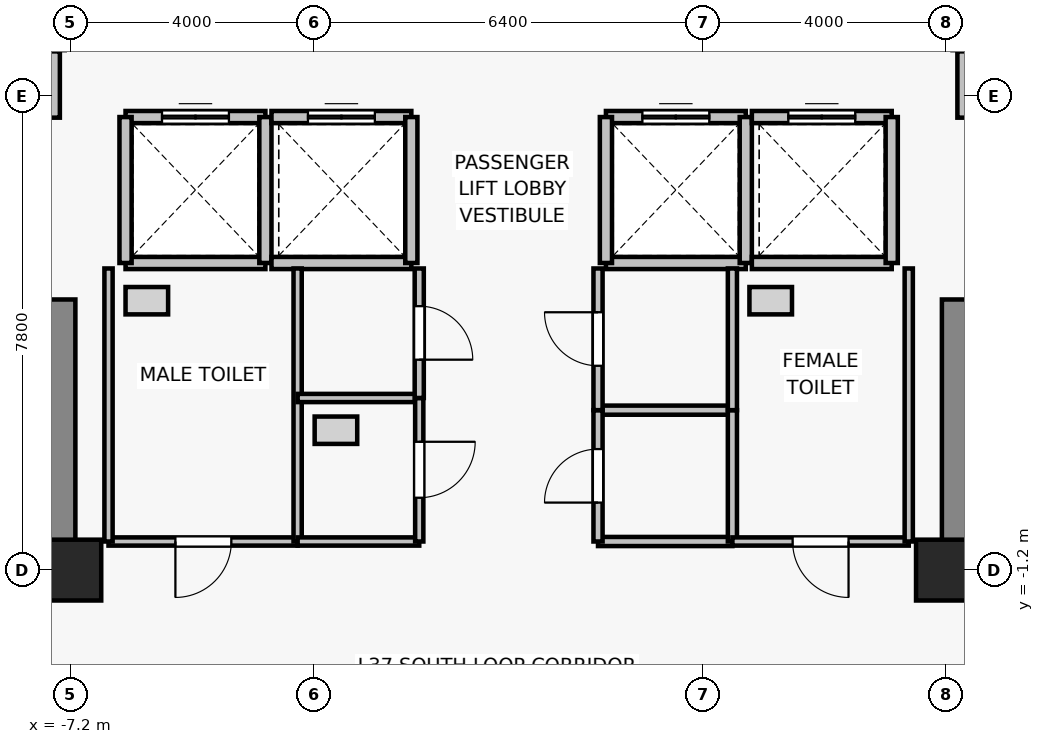
"""IFC4 building model, lengths in metres.
Left out: names, types, materials, properties, quantities, classifications, styles, units other than length and angle.
Written with IfcOpenShell. Run it as: python <this file> out.ifc"""

import sys

from ifc_helpers import new_model, si_unit, direction, frame, frame_2d, origin, origin_2d, place, context, subcontext, project, spatial, rectangle, extrude, source, transform, mapped, element, fill, save


model = new_model("IFC4")
c1 = context("Model", 3, precision=1e-05, world=origin(), true_north=direction((0.0, 1.0)))
c2 = subcontext(c1, "Body", "Model", "MODEL_VIEW")
j1 = project(units=[si_unit("LENGTHUNIT", "METRE"), si_unit("PLANEANGLEUNIT", "RADIAN")], contexts=[c1])
p1 = place(None, origin())
s1 = spatial("IfcSite", under=j1, at=p1, CompositionType="ELEMENT")
p2 = place(p1, origin())
s2 = spatial("IfcBuilding", under=s1, at=p2, CompositionType="ELEMENT")
p3 = place(p2, frame((0.0, 0.0, 133.0)))
s3 = spatial("IfcBuildingStorey", under=s2, at=p3, CompositionType="ELEMENT", Elevation=133.0)
for number, where, z_axis, x_axis in (
    (1, (-7.2, -1.2, 0.0), (0.0, 0.0, 1.0), (1.0, 0.0, 0.0)),
    (2, (7.2, -1.2, 0.0), (0.0, 0.0, 1.0), (1.0, 0.0, 0.0)),
):
    element("IfcColumn", number, at=place(p3, frame(where, z_axis=z_axis, x_axis=x_axis)), inside=s3, PredefinedType="COLUMN", context=c2, shape_type="SweptSolid", body=[
        extrude(rectangle(XDim=1.0, YDim=1.0, at=origin_2d()), origin(), (0.0, 0.0, 1.0), 3.3),
    ])
for number, where, z_axis, x_axis in (
    (3, (-7.4, -0.825, 0.0), (0.0, 0.0, 1.0), (0.0, 1.0, 0.0)),
    (4, (7.4, -0.825, 0.0), (0.0, 0.0, 1.0), (0.0, 1.0, 0.0)),
):
    element("IfcWall", number, at=place(p3, frame(where, z_axis=z_axis, x_axis=x_axis)), inside=s3, PredefinedType="SHEAR", context=c2, shape_type="SweptSolid", body=[
        extrude(rectangle(XDim=4.075, YDim=0.55, at=frame_2d((2.038, 0.0))), origin(), (0.0, 0.0, 1.0), 3.075),
    ])
p4 = place(p3, frame((-4.0, 3.85, 0.0), z_axis=(0.0, 0.0, 1.0), x_axis=(-1.0, 0.0, 0.0)))
e5 = element("IfcWall", 5, at=p4, inside=s3, PredefinedType="SOLIDWALL", context=c2, shape_type="SweptSolid", body=[
    extrude(rectangle(XDim=2.3, YDim=0.2, at=frame_2d((1.15, 0.0))), origin(), (0.0, 0.0, 1.0), 3.075),
])
p5 = place(p3, frame((-6.3, 6.25, 0.0), z_axis=(0.0, 0.0, 1.0), x_axis=(1.0, 0.0, 0.0)))
e6 = element("IfcWall", 6, at=p5, inside=s3, PredefinedType="SOLIDWALL", context=c2, shape_type="SweptSolid", body=[
    extrude(rectangle(XDim=2.3, YDim=0.2, at=frame_2d((1.15, 0.0))), origin(), (0.0, 0.0, 1.0), 3.075),
])
p6 = place(p5, frame((0.6, 0.0, 0.0)))
e7 = element("IfcOpeningElement", 7, at=p6, cuts=e6, PredefinedType="OPENING", context=c2, shape_type="SweptSolid", body=[
    extrude(rectangle(XDim=1.1, YDim=2.2, at=frame_2d((0.55, 1.1))), frame((0.0, 0.11, 0.0), z_axis=(0.0, -1.0, 0.0), x_axis=(1.0, 0.0, 0.0)), (0.0, 0.0, 1.0), 0.22),
])
for number, where, z_axis, x_axis in (
    (8, (-6.3, 3.85, 0.0), (0.0, 0.0, 1.0), (0.0, 1.0, 0.0)),
    (9, (-4.0, 6.25, 0.0), (0.0, 0.0, 1.0), (0.0, -1.0, 0.0)),
):
    element("IfcWall", number, at=place(p3, frame(where, z_axis=z_axis, x_axis=x_axis)), inside=s3, PredefinedType="SOLIDWALL", context=c2, shape_type="SweptSolid", body=[
        extrude(rectangle(XDim=2.4, YDim=0.2, at=frame_2d((1.2, 0.0))), origin(), (0.0, 0.0, 1.0), 3.075),
    ])
p7 = place(p3, frame((-1.6, 3.85, 0.0), z_axis=(0.0, 0.0, 1.0), x_axis=(-1.0, 0.0, 0.0)))
e10 = element("IfcWall", 10, at=p7, inside=s3, PredefinedType="SOLIDWALL", context=c2, shape_type="SweptSolid", body=[
    extrude(rectangle(XDim=2.3, YDim=0.2, at=frame_2d((1.15, 0.0))), origin(), (0.0, 0.0, 1.0), 3.075),
])
p8 = place(p3, frame((-3.9, 6.25, 0.0), z_axis=(0.0, 0.0, 1.0), x_axis=(1.0, 0.0, 0.0)))
e11 = element("IfcWall", 11, at=p8, inside=s3, PredefinedType="SOLIDWALL", context=c2, shape_type="SweptSolid", body=[
    extrude(rectangle(XDim=2.3, YDim=0.2, at=frame_2d((1.15, 0.0))), origin(), (0.0, 0.0, 1.0), 3.075),
])
p9 = place(p8, frame((0.6, 0.0, 0.0)))
e12 = element("IfcOpeningElement", 12, at=p9, cuts=e11, PredefinedType="OPENING", context=c2, shape_type="SweptSolid", body=[
    extrude(rectangle(XDim=1.1, YDim=2.2, at=frame_2d((0.55, 1.1))), frame((0.0, 0.11, 0.0), z_axis=(0.0, -1.0, 0.0), x_axis=(1.0, 0.0, 0.0)), (0.0, 0.0, 1.0), 0.22),
])
p10 = place(p3, frame((-1.6, 6.25, 0.0), z_axis=(0.0, 0.0, 1.0), x_axis=(0.0, -1.0, 0.0)))
e13 = element("IfcWall", 13, at=p10, inside=s3, PredefinedType="SOLIDWALL", context=c2, shape_type="SweptSolid", body=[
    extrude(rectangle(XDim=2.4, YDim=0.2, at=frame_2d((1.2, 0.0))), origin(), (0.0, 0.0, 1.0), 3.075),
])
p11 = place(p3, frame((3.9, 3.85, 0.0), z_axis=(0.0, 0.0, 1.0), x_axis=(-1.0, 0.0, 0.0)))
e14 = element("IfcWall", 14, at=p11, inside=s3, PredefinedType="SOLIDWALL", context=c2, shape_type="SweptSolid", body=[
    extrude(rectangle(XDim=2.3, YDim=0.2, at=frame_2d((1.15, 0.0))), origin(), (0.0, 0.0, 1.0), 3.075),
])
p12 = place(p3, frame((1.6, 6.25, 0.0), z_axis=(0.0, 0.0, 1.0), x_axis=(1.0, 0.0, 0.0)))
e15 = element("IfcWall", 15, at=p12, inside=s3, PredefinedType="SOLIDWALL", context=c2, shape_type="SweptSolid", body=[
    extrude(rectangle(XDim=2.3, YDim=0.2, at=frame_2d((1.15, 0.0))), origin(), (0.0, 0.0, 1.0), 3.075),
])
p13 = place(p12, frame((0.6, 0.0, 0.0)))
e16 = element("IfcOpeningElement", 16, at=p13, cuts=e15, PredefinedType="OPENING", context=c2, shape_type="SweptSolid", body=[
    extrude(rectangle(XDim=1.1, YDim=2.2, at=frame_2d((0.55, 1.1))), frame((0.0, 0.11, 0.0), z_axis=(0.0, -1.0, 0.0), x_axis=(1.0, 0.0, 0.0)), (0.0, 0.0, 1.0), 0.22),
])
for number, where, z_axis, x_axis in (
    (17, (1.6, 3.85, 0.0), (0.0, 0.0, 1.0), (0.0, 1.0, 0.0)),
    (18, (3.9, 6.25, 0.0), (0.0, 0.0, 1.0), (0.0, -1.0, 0.0)),
):
    element("IfcWall", number, at=place(p3, frame(where, z_axis=z_axis, x_axis=x_axis)), inside=s3, PredefinedType="SOLIDWALL", context=c2, shape_type="SweptSolid", body=[
        extrude(rectangle(XDim=2.4, YDim=0.2, at=frame_2d((1.2, 0.0))), origin(), (0.0, 0.0, 1.0), 3.075),
    ])
p14 = place(p3, frame((6.3, 3.85, 0.0), z_axis=(0.0, 0.0, 1.0), x_axis=(-1.0, 0.0, 0.0)))
e19 = element("IfcWall", 19, at=p14, inside=s3, PredefinedType="SOLIDWALL", context=c2, shape_type="SweptSolid", body=[
    extrude(rectangle(XDim=2.3, YDim=0.2, at=frame_2d((1.15, 0.0))), origin(), (0.0, 0.0, 1.0), 3.075),
])
p15 = place(p3, frame((4.0, 6.25, 0.0), z_axis=(0.0, 0.0, 1.0), x_axis=(1.0, 0.0, 0.0)))
e20 = element("IfcWall", 20, at=p15, inside=s3, PredefinedType="SOLIDWALL", context=c2, shape_type="SweptSolid", body=[
    extrude(rectangle(XDim=2.3, YDim=0.2, at=frame_2d((1.15, 0.0))), origin(), (0.0, 0.0, 1.0), 3.075),
])
p16 = place(p15, frame((0.6, 0.0, 0.0)))
e21 = element("IfcOpeningElement", 21, at=p16, cuts=e20, PredefinedType="OPENING", context=c2, shape_type="SweptSolid", body=[
    extrude(rectangle(XDim=1.1, YDim=2.2, at=frame_2d((0.55, 1.1))), frame((0.0, 0.11, 0.0), z_axis=(0.0, -1.0, 0.0), x_axis=(1.0, 0.0, 0.0)), (0.0, 0.0, 1.0), 0.22),
])
p17 = place(p3, frame((6.3, 6.25, 0.0), z_axis=(0.0, 0.0, 1.0), x_axis=(0.0, -1.0, 0.0)))
e22 = element("IfcWall", 22, at=p17, inside=s3, PredefinedType="SOLIDWALL", context=c2, shape_type="SweptSolid", body=[
    extrude(rectangle(XDim=2.4, YDim=0.2, at=frame_2d((1.2, 0.0))), origin(), (0.0, 0.0, 1.0), 3.075),
])
for number, where, z_axis, x_axis in (
    (23, (-7.4, 7.35, 0.0), (0.0, 0.0, 1.0), (-1.0, 0.0, 0.0)),
    (24, (9.6, 7.35, 0.0), (0.0, 0.0, 1.0), (-1.0, 0.0, 0.0)),
):
    element("IfcWall", number, at=place(p3, frame(where, z_axis=z_axis, x_axis=x_axis)), inside=s3, PredefinedType="SOLIDWALL", context=c2, shape_type="SweptSolid", body=[
        extrude(rectangle(XDim=2.2, YDim=0.2, at=frame_2d((1.1, 0.0))), origin(), (0.0, 0.0, 1.0), 2.515),
    ])
for number, where, z_axis, x_axis in (
    (25, (-7.47, 7.33, 0.0), (0.0, 0.0, 1.0), (0.0, -1.0, 0.0)),
    (26, (7.47, 6.24, 0.0), (0.0, 0.0, 1.0), (0.0, 1.0, 0.0)),
):
    element("IfcWall", number, at=place(p3, frame(where, z_axis=z_axis, x_axis=x_axis)), inside=s3, PredefinedType="PARTITIONING", context=c2, shape_type="SweptSolid", body=[
        extrude(rectangle(XDim=1.09, YDim=0.18, at=frame_2d((0.545, 0.0))), origin(), (0.0, 0.0, 1.0), 2.515),
    ])
p18 = place(p3, frame((-3.47, -0.73, 0.0), z_axis=(0.0, 0.0, 1.0), x_axis=(-1.0, 0.0, 0.0)))
e27 = element("IfcWall", 27, at=p18, inside=s3, PredefinedType="PARTITIONING", context=c2, shape_type="SweptSolid", body=[
    extrude(rectangle(XDim=3.11, YDim=0.135, at=frame_2d((1.555, 0.0))), origin(), (0.0, 0.0, 1.0), 3.075),
])
p19 = place(p18, frame((1.09, 0.0, 0.0)))
e28 = element("IfcOpeningElement", 28, at=p19, cuts=e27, PredefinedType="OPENING", context=c2, shape_type="SweptSolid", body=[
    extrude(rectangle(XDim=0.92, YDim=2.1, at=frame_2d((0.46, 1.05))), frame((0.0, 0.077, 0.0), z_axis=(0.0, -1.0, 0.0), x_axis=(1.0, 0.0, 0.0)), (0.0, 0.0, 1.0), 0.155),
])
for number, where, z_axis, x_axis in (
    (29, (-6.58, -0.73, 0.0), (0.0, 0.0, 1.0), (0.0, 1.0, 0.0)),
    (30, (-3.47, 3.76, 0.0), (0.0, 0.0, 1.0), (0.0, -1.0, 0.0)),
):
    element("IfcWall", number, at=place(p3, frame(where, z_axis=z_axis, x_axis=x_axis)), inside=s3, PredefinedType="PARTITIONING", context=c2, shape_type="SweptSolid", body=[
        extrude(rectangle(XDim=4.49, YDim=0.135, at=frame_2d((2.245, 0.0))), origin(), (0.0, 0.0, 1.0), 3.075),
    ])
for number, where, z_axis, x_axis in (
    (31, (-1.47, -0.73, 0.0), (0.0, 0.0, 1.0), (-1.0, 0.0, 0.0)),
    (32, (-3.47, 1.63, 0.0), (0.0, 0.0, 1.0), (1.0, 0.0, 0.0)),
):
    element("IfcWall", number, at=place(p3, frame(where, z_axis=z_axis, x_axis=x_axis)), inside=s3, PredefinedType="PARTITIONING", context=c2, shape_type="SweptSolid", body=[
        extrude(rectangle(XDim=2.0, YDim=0.135, at=frame_2d((1.0, 0.0))), origin(), (0.0, 0.0, 1.0), 3.075),
    ])
p20 = place(p3, frame((-1.47, 1.63, 0.0), z_axis=(0.0, 0.0, 1.0), x_axis=(0.0, -1.0, 0.0)))
e33 = element("IfcWall", 33, at=p20, inside=s3, PredefinedType="PARTITIONING", context=c2, shape_type="SweptSolid", body=[
    extrude(rectangle(XDim=2.36, YDim=0.135, at=frame_2d((1.18, 0.0))), origin(), (0.0, 0.0, 1.0), 3.075),
])
p21 = place(p20, frame((0.72, 0.0, 0.0)))
e34 = element("IfcOpeningElement", 34, at=p21, cuts=e33, PredefinedType="OPENING", context=c2, shape_type="SweptSolid", body=[
    extrude(rectangle(XDim=0.92, YDim=2.1, at=frame_2d((0.46, 1.05))), frame((0.0, 0.077, 0.0), z_axis=(0.0, -1.0, 0.0), x_axis=(1.0, 0.0, 0.0)), (0.0, 0.0, 1.0), 0.155),
])
p22 = place(p3, frame((-1.47, 3.76, 0.0), z_axis=(0.0, 0.0, 1.0), x_axis=(0.0, -1.0, 0.0)))
e35 = element("IfcWall", 35, at=p22, inside=s3, PredefinedType="PARTITIONING", context=c2, shape_type="SweptSolid", body=[
    extrude(rectangle(XDim=2.13, YDim=0.15, at=frame_2d((1.065, 0.0))), origin(), (0.0, 0.0, 1.0), 3.075),
])
p23 = place(p22, frame((0.62, 0.0, 0.0)))
e36 = element("IfcOpeningElement", 36, at=p23, cuts=e35, PredefinedType="OPENING", context=c2, shape_type="SweptSolid", body=[
    extrude(rectangle(XDim=0.88, YDim=2.1, at=frame_2d((0.44, 1.05))), frame((0.0, 0.085, 0.0), z_axis=(0.0, -1.0, 0.0), x_axis=(1.0, 0.0, 0.0)), (0.0, 0.0, 1.0), 0.17),
])
for number, where, z_axis, x_axis in (
    (37, (3.68, -0.73, 0.0), (0.0, 0.0, 1.0), (-1.0, 0.0, 0.0)),
    (38, (1.47, 1.43, 0.0), (0.0, 0.0, 1.0), (1.0, 0.0, 0.0)),
):
    element("IfcWall", number, at=place(p3, frame(where, z_axis=z_axis, x_axis=x_axis)), inside=s3, PredefinedType="PARTITIONING", context=c2, shape_type="SweptSolid", body=[
        extrude(rectangle(XDim=2.21, YDim=0.15, at=frame_2d((1.105, 0.0))), origin(), (0.0, 0.0, 1.0), 3.075),
    ])
p24 = place(p3, frame((1.47, -0.73, 0.0), z_axis=(0.0, 0.0, 1.0), x_axis=(0.0, 1.0, 0.0)))
e39 = element("IfcWall", 39, at=p24, inside=s3, PredefinedType="PARTITIONING", context=c2, shape_type="SweptSolid", body=[
    extrude(rectangle(XDim=2.16, YDim=0.15, at=frame_2d((1.08, 0.0))), origin(), (0.0, 0.0, 1.0), 3.075),
])
p25 = place(p24, frame((0.64, 0.0, 0.0)))
e40 = element("IfcOpeningElement", 40, at=p25, cuts=e39, PredefinedType="OPENING", context=c2, shape_type="SweptSolid", body=[
    extrude(rectangle(XDim=0.88, YDim=2.1, at=frame_2d((0.44, 1.05))), frame((0.0, 0.085, 0.0), z_axis=(0.0, -1.0, 0.0), x_axis=(1.0, 0.0, 0.0)), (0.0, 0.0, 1.0), 0.17),
])
p26 = place(p3, frame((3.68, 1.43, 0.0), z_axis=(0.0, 0.0, 1.0), x_axis=(0.0, -1.0, 0.0)))
e41 = element("IfcWall", 41, at=p26, inside=s3, PredefinedType="PARTITIONING", context=c2, shape_type="SweptSolid", body=[
    extrude(rectangle(XDim=2.16, YDim=0.15, at=frame_2d((1.08, 0.0))), origin(), (0.0, 0.0, 1.0), 3.075),
])
p27 = place(p3, frame((1.47, 1.43, 0.0), z_axis=(0.0, 0.0, 1.0), x_axis=(0.0, 1.0, 0.0)))
e42 = element("IfcWall", 42, at=p27, inside=s3, PredefinedType="PARTITIONING", context=c2, shape_type="SweptSolid", body=[
    extrude(rectangle(XDim=2.33, YDim=0.15, at=frame_2d((1.165, 0.0))), origin(), (0.0, 0.0, 1.0), 3.075),
])
p28 = place(p27, frame((0.73, 0.0, 0.0)))
e43 = element("IfcOpeningElement", 43, at=p28, cuts=e42, PredefinedType="OPENING", context=c2, shape_type="SweptSolid", body=[
    extrude(rectangle(XDim=0.88, YDim=2.15, at=frame_2d((0.44, 1.075))), frame((0.0, 0.085, 0.0), z_axis=(0.0, -1.0, 0.0), x_axis=(1.0, 0.0, 0.0)), (0.0, 0.0, 1.0), 0.17),
])
p29 = place(p3, frame((3.68, 3.76, 0.0), z_axis=(0.0, 0.0, 1.0), x_axis=(0.0, -1.0, 0.0)))
e44 = element("IfcWall", 44, at=p29, inside=s3, PredefinedType="PARTITIONING", context=c2, shape_type="SweptSolid", body=[
    extrude(rectangle(XDim=2.33, YDim=0.15, at=frame_2d((1.165, 0.0))), origin(), (0.0, 0.0, 1.0), 3.075),
])
p30 = place(p3, frame((6.58, -0.73, 0.0), z_axis=(0.0, 0.0, 1.0), x_axis=(-1.0, 0.0, 0.0)))
e45 = element("IfcWall", 45, at=p30, inside=s3, PredefinedType="PARTITIONING", context=c2, shape_type="SweptSolid", body=[
    extrude(rectangle(XDim=2.9, YDim=0.135, at=frame_2d((1.45, 0.0))), origin(), (0.0, 0.0, 1.0), 3.075),
])
p31 = place(p30, frame((0.99, 0.0, 0.0)))
e46 = element("IfcOpeningElement", 46, at=p31, cuts=e45, PredefinedType="OPENING", context=c2, shape_type="SweptSolid", body=[
    extrude(rectangle(XDim=0.92, YDim=2.1, at=frame_2d((0.46, 1.05))), frame((0.0, 0.077, 0.0), z_axis=(0.0, -1.0, 0.0), x_axis=(1.0, 0.0, 0.0)), (0.0, 0.0, 1.0), 0.155),
])
p32 = place(p3, frame((6.58, 3.76, 0.0), z_axis=(0.0, 0.0, 1.0), x_axis=(0.0, -1.0, 0.0)))
e47 = element("IfcWall", 47, at=p32, inside=s3, PredefinedType="PARTITIONING", context=c2, shape_type="SweptSolid", body=[
    extrude(rectangle(XDim=4.49, YDim=0.135, at=frame_2d((2.245, 0.0))), origin(), (0.0, 0.0, 1.0), 3.075),
])
m1 = source(origin(), c2, "Body", "SweptSolid", [
    extrude(rectangle(XDim=1.1, YDim=2.2, at=frame_2d((0.55, 1.1))), frame((0.0, 0.025, 0.0), z_axis=(0.0, -1.0, 0.0), x_axis=(1.0, 0.0, 0.0)), (0.0, 0.0, 1.0), 0.05),
])
p33 = place(p6, origin())
e48 = element("IfcDoor", 48, at=p33, inside=s3, OperationType="DOUBLE_DOOR_SLIDING", PredefinedType="DOOR", context=c2, shape_type="MappedRepresentation", body=[
    mapped(m1, transform((0.0, 0.0, 0.0), x_axis=(1.0, 0.0, 0.0), y_axis=(0.0, 1.0, 0.0), z_axis=(0.0, 0.0, 1.0), scale=1.0)),
])
fill(e7, e48)
p34 = place(p9, origin())
e49 = element("IfcDoor", 49, at=p34, inside=s3, OperationType="DOUBLE_DOOR_SLIDING", PredefinedType="DOOR", context=c2, shape_type="MappedRepresentation", body=[
    mapped(m1, transform((0.0, 0.0, 0.0), x_axis=(1.0, 0.0, 0.0), y_axis=(0.0, 1.0, 0.0), z_axis=(0.0, 0.0, 1.0), scale=1.0)),
])
fill(e12, e49)
p35 = place(p13, origin())
e50 = element("IfcDoor", 50, at=p35, inside=s3, OperationType="DOUBLE_DOOR_SLIDING", PredefinedType="DOOR", context=c2, shape_type="MappedRepresentation", body=[
    mapped(m1, transform((0.0, 0.0, 0.0), x_axis=(1.0, 0.0, 0.0), y_axis=(0.0, 1.0, 0.0), z_axis=(0.0, 0.0, 1.0), scale=1.0)),
])
fill(e16, e50)
p36 = place(p16, origin())
e51 = element("IfcDoor", 51, at=p36, inside=s3, OperationType="DOUBLE_DOOR_SLIDING", PredefinedType="DOOR", context=c2, shape_type="MappedRepresentation", body=[
    mapped(m1, transform((0.0, 0.0, 0.0), x_axis=(1.0, 0.0, 0.0), y_axis=(0.0, 1.0, 0.0), z_axis=(0.0, 0.0, 1.0), scale=1.0)),
])
fill(e21, e51)
m2 = source(origin(), c2, "Body", "SweptSolid", [
    extrude(rectangle(XDim=0.92, YDim=2.1, at=frame_2d((0.46, 1.05))), frame((0.0, 0.025, 0.0), z_axis=(0.0, -1.0, 0.0), x_axis=(1.0, 0.0, 0.0)), (0.0, 0.0, 1.0), 0.05),
])
p37 = place(p19, origin())
e52 = element("IfcDoor", 52, at=p37, inside=s3, OperationType="SINGLE_SWING_RIGHT", PredefinedType="DOOR", context=c2, shape_type="MappedRepresentation", body=[
    mapped(m2, transform((0.0, 0.0, 0.0), x_axis=(1.0, 0.0, 0.0), y_axis=(0.0, 1.0, 0.0), z_axis=(0.0, 0.0, 1.0), scale=1.0)),
])
fill(e28, e52)
p38 = place(p21, origin())
e53 = element("IfcDoor", 53, at=p38, inside=s3, OperationType="SINGLE_SWING_LEFT", PredefinedType="DOOR", context=c2, shape_type="MappedRepresentation", body=[
    mapped(m2, transform((0.0, 0.0, 0.0), x_axis=(1.0, 0.0, 0.0), y_axis=(0.0, 1.0, 0.0), z_axis=(0.0, 0.0, 1.0), scale=1.0)),
])
fill(e34, e53)
m3 = source(origin(), c2, "Body", "SweptSolid", [
    extrude(rectangle(XDim=0.88, YDim=2.1, at=frame_2d((0.44, 1.05))), frame((0.0, 0.025, 0.0), z_axis=(0.0, -1.0, 0.0), x_axis=(1.0, 0.0, 0.0)), (0.0, 0.0, 1.0), 0.05),
])
p39 = place(p23, origin())
e54 = element("IfcDoor", 54, at=p39, inside=s3, OperationType="SINGLE_SWING_RIGHT", PredefinedType="DOOR", context=c2, shape_type="MappedRepresentation", body=[
    mapped(m3, transform((0.0, 0.0, 0.0), x_axis=(1.0, 0.0, 0.0), y_axis=(0.0, 1.0, 0.0), z_axis=(0.0, 0.0, 1.0), scale=1.0)),
])
fill(e36, e54)
p40 = place(p25, origin())
e55 = element("IfcDoor", 55, at=p40, inside=s3, OperationType="SINGLE_SWING_LEFT", PredefinedType="DOOR", context=c2, shape_type="MappedRepresentation", body=[
    mapped(m3, transform((0.0, 0.0, 0.0), x_axis=(1.0, 0.0, 0.0), y_axis=(0.0, 1.0, 0.0), z_axis=(0.0, 0.0, 1.0), scale=1.0)),
])
fill(e40, e55)
m4 = source(origin(), c2, "Body", "SweptSolid", [
    extrude(rectangle(XDim=0.88, YDim=2.15, at=frame_2d((0.44, 1.075))), frame((0.0, 0.025, 0.0), z_axis=(0.0, -1.0, 0.0), x_axis=(1.0, 0.0, 0.0)), (0.0, 0.0, 1.0), 0.05),
])
p41 = place(p28, origin())
e56 = element("IfcDoor", 56, at=p41, inside=s3, OperationType="SINGLE_SWING_RIGHT", PredefinedType="DOOR", context=c2, shape_type="MappedRepresentation", body=[
    mapped(m4, transform((0.0, 0.0, 0.0), x_axis=(1.0, 0.0, 0.0), y_axis=(0.0, 1.0, 0.0), z_axis=(0.0, 0.0, 1.0), scale=1.0)),
])
fill(e43, e56)
p42 = place(p31, origin())
e57 = element("IfcDoor", 57, at=p42, inside=s3, OperationType="SINGLE_SWING_LEFT", PredefinedType="DOOR", context=c2, shape_type="MappedRepresentation", body=[
    mapped(m2, transform((0.0, 0.0, 0.0), x_axis=(1.0, 0.0, 0.0), y_axis=(0.0, 1.0, 0.0), z_axis=(0.0, 0.0, 1.0), scale=1.0)),
])
fill(e46, e57)
save(model, sys.argv[1])
